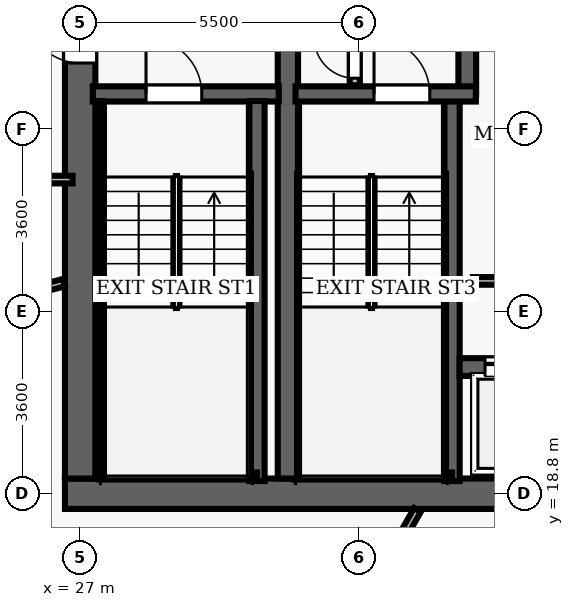
"""IFC4 building model, lengths in metres.
Left out: names, types, materials, properties, quantities, classifications, styles, units other than length and angle.
Written with IfcOpenShell. Run it as: python <this file> out.ifc"""

import sys

from ifc_helpers import new_model, si_unit, direction, frame, frame_2d, origin, place, context, subcontext, project, spatial, rectangle, extrude, element, fill, save


model = new_model("IFC4")
c1 = context("Model", 3, precision=1e-05, world=origin(), true_north=direction((0.0, 1.0)))
c2 = subcontext(c1, "Body", "Model", "MODEL_VIEW")
j1 = project(units=[si_unit("LENGTHUNIT", "METRE"), si_unit("PLANEANGLEUNIT", "RADIAN")], contexts=[c1])
p1 = place(None, origin())
s1 = spatial("IfcSite", under=j1, at=p1, CompositionType="ELEMENT")
p2 = place(p1, origin())
s2 = spatial("IfcBuilding", under=s1, at=p2, CompositionType="ELEMENT")
p3 = place(p2, frame((0.0, 0.0, 127.3)))
s3 = spatial("IfcBuildingStorey", under=s2, at=p3, CompositionType="ELEMENT", Elevation=127.3)
p4 = place(p3, frame((26.7, 18.8, 0.0), z_axis=(0.0, 0.0, 1.0), x_axis=(1.0, 0.0, 0.0)))
e1 = element("IfcWall", 1, at=p4, inside=s3, PredefinedType="SHEAR", context=c2, shape_type="SweptSolid", body=[
    extrude(rectangle(XDim=22.6, YDim=0.6, at=frame_2d((11.3, 0.0))), origin(), (0.0, 0.0, 1.0), 3.5),
])
p5 = place(p4, frame((14.52, 0.0, 0.0)))
e2 = element("IfcOpeningElement", 2, at=p5, cuts=e1, PredefinedType="OPENING", context=c2, shape_type="SweptSolid", body=[
    extrude(rectangle(XDim=1.05, YDim=2.15, at=frame_2d((0.525, 1.075))), frame((0.0, 0.31, 0.0), z_axis=(0.0, -1.0, 0.0), x_axis=(1.0, 0.0, 0.0)), (0.0, 0.0, 1.0), 0.62),
])
p6 = place(p3, frame((27.0, 19.1, 0.0), z_axis=(0.0, 0.0, 1.0), x_axis=(0.0, 1.0, 0.0)))
e3 = element("IfcWall", 3, at=p6, inside=s3, PredefinedType="SHEAR", context=c2, shape_type="SweptSolid", body=[
    extrude(rectangle(XDim=13.8, YDim=0.6, at=frame_2d((6.9, 0.0))), origin(), (0.0, 0.0, 1.0), 3.5),
])
p7 = place(p6, frame((8.2, 0.0, 0.0)))
e4 = element("IfcOpeningElement", 4, at=p7, cuts=e3, PredefinedType="OPENING", context=c2, shape_type="SweptSolid", body=[
    extrude(rectangle(XDim=1.05, YDim=2.15, at=frame_2d((0.525, 1.075))), frame((0.0, 0.31, 0.0), z_axis=(0.0, -1.0, 0.0), x_axis=(1.0, 0.0, 0.0)), (0.0, 0.0, 1.0), 0.62),
])
p8 = place(p3, frame((31.1, 19.1, 0.0), z_axis=(0.0, 0.0, 1.0), x_axis=(0.0, 1.0, 0.0)))
e5 = element("IfcWall", 5, at=p8, inside=s3, PredefinedType="SHEAR", context=c2, shape_type="SweptSolid", body=[
    extrude(rectangle(XDim=13.8, YDim=0.4, at=frame_2d((6.9, 0.0))), origin(), (0.0, 0.0, 1.0), 3.5),
])
p9 = place(p3, frame((27.25, 26.69, 0.0), z_axis=(0.0, 0.0, 1.0), x_axis=(1.0, 0.0, 0.0)))
e6 = element("IfcWall", 6, at=p9, inside=s3, PredefinedType="SHEAR", context=c2, shape_type="SweptSolid", body=[
    extrude(rectangle(XDim=3.67, YDim=0.3, at=frame_2d((1.835, 0.0))), origin(), (0.0, 0.0, 1.0), 3.5),
])
p10 = place(p9, frame((1.05, 0.0, 0.0)))
e7 = element("IfcOpeningElement", 7, at=p10, cuts=e6, PredefinedType="OPENING", context=c2, shape_type="SweptSolid", body=[
    extrude(rectangle(XDim=1.1, YDim=2.15, at=frame_2d((0.55, 1.075))), frame((0.0, 0.16, 0.0), z_axis=(0.0, -1.0, 0.0), x_axis=(1.0, 0.0, 0.0)), (0.0, 0.0, 1.0), 0.32),
])
p11 = place(p3, frame((30.49, 19.05, 0.0), z_axis=(0.0, 0.0, 1.0), x_axis=(0.0, 1.0, 0.0)))
e8 = element("IfcWall", 8, at=p11, inside=s3, PredefinedType="SHEAR", context=c2, shape_type="SweptSolid", body=[
    extrude(rectangle(XDim=7.5, YDim=0.3, at=frame_2d((3.75, 0.0))), origin(), (0.0, 0.0, 1.0), 3.5),
])
p12 = place(p3, frame((27.395, 19.1, 0.0), z_axis=(0.0, 0.0, 1.0), x_axis=(0.0, 1.0, 0.0)))
e9 = element("IfcWall", 9, at=p12, inside=s3, PredefinedType="SHEAR", context=c2, shape_type="SweptSolid", body=[
    extrude(rectangle(XDim=7.45, YDim=0.12, at=frame_2d((3.725, 0.0))), origin(), (0.0, 0.0, 1.0), 3.5),
])
p13 = place(p3, frame((27.395, 19.16, 0.0), z_axis=(0.0, 0.0, 1.0), x_axis=(1.0, 0.0, 0.0)))
e10 = element("IfcWall", 10, at=p13, inside=s3, PredefinedType="SHEAR", context=c2, shape_type="SweptSolid", body=[
    extrude(rectangle(XDim=3.095, YDim=0.12, at=frame_2d((1.547, 0.0))), origin(), (0.0, 0.0, 1.0), 3.5),
])
p14 = place(p3, frame((34.34, 19.05, 0.0), z_axis=(0.0, 0.0, 1.0), x_axis=(0.0, 1.0, 0.0)))
e11 = element("IfcWall", 11, at=p14, inside=s3, PredefinedType="SHEAR", context=c2, shape_type="SweptSolid", body=[
    extrude(rectangle(XDim=7.5, YDim=0.3, at=frame_2d((3.75, 0.0))), origin(), (0.0, 0.0, 1.0), 3.5),
])
p15 = place(p3, frame((34.64, 26.69, 0.0), z_axis=(0.0, 0.0, 1.0), x_axis=(0.0, 1.0, 0.0)))
e12 = element("IfcWall", 12, at=p15, inside=s3, PredefinedType="SHEAR", context=c2, shape_type="SweptSolid", body=[
    extrude(rectangle(XDim=6.26, YDim=0.35, at=frame_2d((3.13, 0.0))), origin(), (0.0, 0.0, 1.0), 3.5),
])
p16 = place(p3, frame((31.25, 26.69, 0.0), z_axis=(0.0, 0.0, 1.0), x_axis=(1.0, 0.0, 0.0)))
e13 = element("IfcWall", 13, at=p16, inside=s3, PredefinedType="SHEAR", context=c2, shape_type="SweptSolid", body=[
    extrude(rectangle(XDim=3.56, YDim=0.3, at=frame_2d((1.78, 0.0))), origin(), (0.0, 0.0, 1.0), 3.5),
])
p17 = place(p16, frame((1.55, 0.0, 0.0)))
e14 = element("IfcOpeningElement", 14, at=p17, cuts=e13, PredefinedType="OPENING", context=c2, shape_type="SweptSolid", body=[
    extrude(rectangle(XDim=1.1, YDim=2.15, at=frame_2d((0.55, 1.075))), frame((0.0, 0.16, 0.0), z_axis=(0.0, -1.0, 0.0), x_axis=(1.0, 0.0, 0.0)), (0.0, 0.0, 1.0), 0.32),
])
p18 = place(p3, frame((31.3, 19.16, 0.0), z_axis=(0.0, 0.0, 1.0), x_axis=(1.0, 0.0, 0.0)))
e15 = element("IfcWall", 15, at=p18, inside=s3, PredefinedType="SHEAR", context=c2, shape_type="SweptSolid", body=[
    extrude(rectangle(XDim=3.04, YDim=0.12, at=frame_2d((1.52, 0.0))), origin(), (0.0, 0.0, 1.0), 3.5),
])
p19 = place(p3, frame((32.42, 26.86, 0.0), z_axis=(0.0, 0.0, 1.0), x_axis=(0.0, 1.0, 0.0)))
e16 = element("IfcWall", 16, at=p19, inside=s3, PredefinedType="PARTITIONING", context=c2, shape_type="SweptSolid", body=[
    extrude(rectangle(XDim=2.04, YDim=0.2, at=frame_2d((1.02, 0.0))), origin(), (0.0, 0.0, 1.0), 2.675),
])
p20 = place(p19, frame((0.14, 0.0, 0.0)))
e17 = element("IfcOpeningElement", 17, at=p20, cuts=e16, PredefinedType="OPENING", context=c2, shape_type="SweptSolid", body=[
    extrude(rectangle(XDim=0.8, YDim=2.05, at=frame_2d((0.4, 1.025))), frame((0.0, 0.11, 0.0), z_axis=(0.0, -1.0, 0.0), x_axis=(1.0, 0.0, 0.0)), (0.0, 0.0, 1.0), 0.22),
])
p21 = place(p3, frame((34.49, 21.3, 0.0), z_axis=(0.0, 0.0, 1.0), x_axis=(1.0, 0.0, 0.0)))
e18 = element("IfcWall", 18, at=p21, inside=s3, PredefinedType="SHEAR", context=c2, shape_type="SweptSolid", body=[
    extrude(rectangle(XDim=6.68, YDim=0.35, at=frame_2d((3.34, 0.0))), origin(), (0.0, 0.0, 1.0), 2.675),
])
p22 = place(p21, frame((0.5, 0.0, 0.0)))
e19 = element("IfcOpeningElement", 19, at=p22, cuts=e18, PredefinedType="OPENING", context=c2, shape_type="SweptSolid", body=[
    extrude(rectangle(XDim=0.9, YDim=2.15, at=frame_2d((0.45, 1.075))), frame((0.0, 0.185, 0.0), z_axis=(0.0, -1.0, 0.0), x_axis=(1.0, 0.0, 0.0)), (0.0, 0.0, 1.0), 0.37),
])
p23 = place(p21, frame((2.58, 0.0, 0.0)))
e20 = element("IfcOpeningElement", 20, at=p23, cuts=e18, PredefinedType="OPENING", context=c2, shape_type="SweptSolid", body=[
    extrude(rectangle(XDim=0.9, YDim=2.15, at=frame_2d((0.45, 1.075))), frame((0.0, 0.185, 0.0), z_axis=(0.0, -1.0, 0.0), x_axis=(1.0, 0.0, 0.0)), (0.0, 0.0, 1.0), 0.37),
])
p24 = place(p21, frame((4.66, 0.0, 0.0)))
e21 = element("IfcOpeningElement", 21, at=p24, cuts=e18, PredefinedType="OPENING", context=c2, shape_type="SweptSolid", body=[
    extrude(rectangle(XDim=0.9, YDim=2.15, at=frame_2d((0.45, 1.075))), frame((0.0, 0.185, 0.0), z_axis=(0.0, -1.0, 0.0), x_axis=(1.0, 0.0, 0.0)), (0.0, 0.0, 1.0), 0.37),
])
p25 = place(p3, frame((34.75, 23.0, 0.0), z_axis=(0.0, 0.0, 1.0), x_axis=(1.0, 0.0, 0.0)))
e22 = element("IfcWall", 22, at=p25, inside=s3, PredefinedType="PARTITIONING", context=c2, shape_type="SweptSolid", body=[
    extrude(rectangle(XDim=6.25, YDim=0.15, at=frame_2d((3.125, 0.0))), origin(), (0.0, 0.0, 1.0), 2.675),
])
p26 = place(p3, frame((14.5, 25.0, 0.0), z_axis=(0.0, 0.0, 1.0), x_axis=(1.0, 0.0, 0.0)))
e23 = element("IfcWall", 23, at=p26, inside=s3, PredefinedType="PARTITIONING", context=c2, shape_type="SweptSolid", body=[
    extrude(rectangle(XDim=12.35, YDim=0.15, at=frame_2d((6.175, 0.0))), origin(), (0.0, 0.0, 1.0), 2.675),
])
p27 = place(p3, frame((26.68, 22.967, 0.0), z_axis=(0.0, 0.0, 1.0), x_axis=(-0.965923864026, -0.258826368257, 0.0)))
e24 = element("IfcWall", 24, at=p27, inside=s3, PredefinedType="PARTITIONING", context=c2, shape_type="SweptSolid", body=[
    extrude(rectangle(XDim=12.886, YDim=0.15, at=frame_2d((6.443, 0.0))), origin(), (0.0, 0.0, 1.0), 2.675),
])
p28 = place(p3, frame((33.658, 18.48, 0.0), z_axis=(0.0, 0.0, 1.0), x_axis=(-0.500002865972, -0.866023749108, 0.0)))
e25 = element("IfcWall", 25, at=p28, inside=s3, PredefinedType="PARTITIONING", context=c2, shape_type="SweptSolid", body=[
    extrude(rectangle(XDim=14.244, YDim=0.15, at=frame_2d((7.122, 0.0))), origin(), (0.0, 0.0, 1.0), 2.675),
])
p29 = place(p10, origin())
e26 = element("IfcDoor", 26, at=p29, inside=s3, OperationType="SINGLE_SWING_LEFT", PredefinedType="DOOR", context=c2, shape_type="SweptSolid", body=[
    extrude(rectangle(XDim=1.1, YDim=2.15, at=frame_2d((0.55, 1.075))), frame((0.0, 0.025, 0.0), z_axis=(0.0, -1.0, 0.0), x_axis=(1.0, 0.0, 0.0)), (0.0, 0.0, 1.0), 0.05),
])
fill(e7, e26)
p30 = place(p7, origin())
e27 = element("IfcDoor", 27, at=p30, inside=s3, OperationType="SINGLE_SWING_RIGHT", PredefinedType="DOOR", context=c2, shape_type="SweptSolid", body=[
    extrude(rectangle(XDim=1.05, YDim=2.15, at=frame_2d((0.525, 1.075))), frame((0.0, 0.025, 0.0), z_axis=(0.0, -1.0, 0.0), x_axis=(1.0, 0.0, 0.0)), (0.0, 0.0, 1.0), 0.05),
])
fill(e4, e27)
p31 = place(p17, origin())
e28 = element("IfcDoor", 28, at=p31, inside=s3, OperationType="SINGLE_SWING_LEFT", PredefinedType="DOOR", context=c2, shape_type="SweptSolid", body=[
    extrude(rectangle(XDim=1.1, YDim=2.15, at=frame_2d((0.55, 1.075))), frame((0.0, 0.025, 0.0), z_axis=(0.0, -1.0, 0.0), x_axis=(1.0, 0.0, 0.0)), (0.0, 0.0, 1.0), 0.05),
])
fill(e14, e28)
p32 = place(p20, origin())
e29 = element("IfcDoor", 29, at=p32, inside=s3, OperationType="SINGLE_SWING_RIGHT", PredefinedType="DOOR", context=c2, shape_type="SweptSolid", body=[
    extrude(rectangle(XDim=0.8, YDim=2.05, at=frame_2d((0.4, 1.025))), frame((0.0, 0.025, 0.0), z_axis=(0.0, -1.0, 0.0), x_axis=(1.0, 0.0, 0.0)), (0.0, 0.0, 1.0), 0.05),
])
fill(e17, e29)
p33 = place(p22, origin())
e30 = element("IfcDoor", 30, at=p33, inside=s3, OperationType="SLIDING_TO_LEFT", PredefinedType="DOOR", context=c2, shape_type="SweptSolid", body=[
    extrude(rectangle(XDim=0.9, YDim=2.15, at=frame_2d((0.45, 1.075))), frame((0.0, 0.025, 0.0), z_axis=(0.0, -1.0, 0.0), x_axis=(1.0, 0.0, 0.0)), (0.0, 0.0, 1.0), 0.05),
])
fill(e19, e30)
save(model, sys.argv[1])
